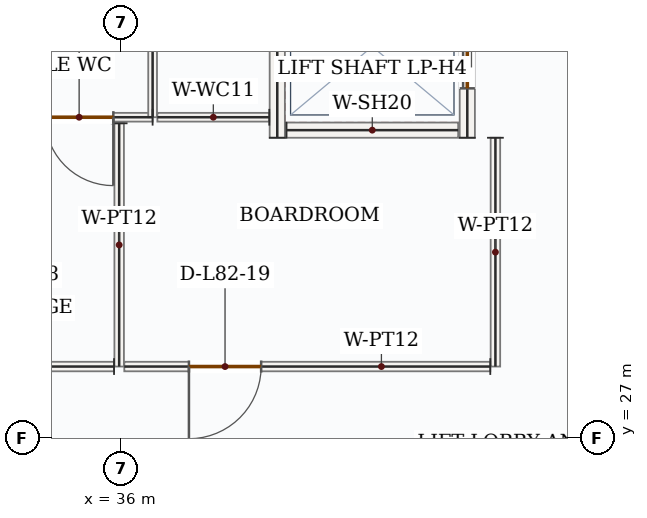
"""IFC4 building model, lengths in metres.
Left out: names, types, materials, properties, quantities, classifications, styles, units other than length and angle.
Written with IfcOpenShell. Run it as: python <this file> out.ifc"""

import sys

from ifc_helpers import new_model, si_unit, direction, frame, frame_2d, origin, place, context, subcontext, project, spatial, rectangle, extrude, source, transform, mapped, element, fill, save


model = new_model("IFC4")
c1 = context("Model", 3, precision=1e-05, world=origin(), true_north=direction((0.0, 1.0)))
c2 = subcontext(c1, "Body", "Model", "MODEL_VIEW")
j1 = project(units=[si_unit("LENGTHUNIT", "METRE"), si_unit("PLANEANGLEUNIT", "RADIAN")], contexts=[c1])
p1 = place(None, origin())
s1 = spatial("IfcSite", under=j1, at=p1, CompositionType="ELEMENT")
p2 = place(p1, origin())
s2 = spatial("IfcBuilding", under=s1, at=p2, CompositionType="ELEMENT")
p3 = place(p2, frame((0.0, 0.0, 338.55)))
s3 = spatial("IfcBuildingStorey", under=s2, at=p3, CompositionType="ELEMENT", Elevation=338.55)
m1 = source(origin(), c2, "Body", "SweptSolid", [
    extrude(rectangle(XDim=2.4, YDim=0.2, at=frame_2d((1.2, 0.0))), origin(), (0.0, 0.0, 1.0), 3.5),
])
p4 = place(p3, frame((38.05, 30.95, 0.0), z_axis=(0.0, 0.0, 1.0), x_axis=(0.0, 1.0, 0.0)))
e1 = element("IfcWall", 1, at=p4, inside=s3, PredefinedType="SOLIDWALL", context=c2, shape_type="MappedRepresentation", body=[
    mapped(m1, transform((0.0, 0.0, 0.0), x_axis=(1.0, 0.0, 0.0), y_axis=(0.0, 1.0, 0.0), z_axis=(0.0, 0.0, 1.0), scale=1.0)),
])
p5 = place(p3, frame((40.55, 30.95, 0.0), z_axis=(0.0, 0.0, 1.0), x_axis=(0.0, 1.0, 0.0)))
e2 = element("IfcWall", 2, at=p5, inside=s3, PredefinedType="SOLIDWALL", context=c2, shape_type="SweptSolid", body=[
    extrude(rectangle(XDim=2.4, YDim=0.2, at=frame_2d((1.2, 0.0))), origin(), (0.0, 0.0, 1.0), 3.5),
])
p6 = place(p5, frame((0.65, 0.0, 0.0)))
e3 = element("IfcOpeningElement", 3, at=p6, cuts=e2, PredefinedType="OPENING", context=c2, shape_type="SweptSolid", body=[
    extrude(rectangle(XDim=1.1, YDim=2.15, at=frame_2d((0.55, 1.075))), frame((0.0, 0.11, 0.0), z_axis=(0.0, -1.0, 0.0), x_axis=(1.0, 0.0, 0.0)), (0.0, 0.0, 1.0), 0.22),
])
m2 = source(origin(), c2, "Body", "SweptSolid", [
    extrude(rectangle(XDim=2.26, YDim=0.2, at=frame_2d((1.13, 0.0))), origin(), (0.0, 0.0, 1.0), 3.5),
])
p7 = place(p3, frame((38.17, 31.05, 0.0), z_axis=(0.0, 0.0, 1.0), x_axis=(1.0, 0.0, 0.0)))
e4 = element("IfcWall", 4, at=p7, inside=s3, PredefinedType="SOLIDWALL", context=c2, shape_type="MappedRepresentation", body=[
    mapped(m2, transform((0.0, 0.0, 0.0), x_axis=(1.0, 0.0, 0.0), y_axis=(0.0, 1.0, 0.0), z_axis=(0.0, 0.0, 1.0), scale=1.0)),
])
p8 = place(p3, frame((36.41, 31.22, 0.0), z_axis=(0.0, 0.0, 1.0), x_axis=(-1.0, 0.0, 0.0)))
e5 = element("IfcWall", 5, at=p8, inside=s3, PredefinedType="PARTITIONING", context=c2, shape_type="SweptSolid", body=[
    extrude(rectangle(XDim=2.355, YDim=0.115, at=frame_2d((1.177, 0.0))), origin(), (0.0, 0.0, 1.0), 3.5),
])
p9 = place(p8, frame((0.517, 0.0, 0.0)))
e6 = element("IfcOpeningElement", 6, at=p9, cuts=e5, PredefinedType="OPENING", context=c2, shape_type="SweptSolid", body=[
    extrude(rectangle(XDim=0.9, YDim=2.1, at=frame_2d((0.45, 1.05))), frame((0.0, 0.067, 0.0), z_axis=(0.0, -1.0, 0.0), x_axis=(1.0, 0.0, 0.0)), (0.0, 0.0, 1.0), 0.135),
])
m3 = source(origin(), c2, "Body", "SweptSolid", [
    extrude(rectangle(XDim=1.96, YDim=0.115, at=frame_2d((0.98, 0.0))), origin(), (0.0, 0.0, 1.0), 3.5),
])
p10 = place(p3, frame((36.41, 33.18, 0.0), z_axis=(0.0, 0.0, 1.0), x_axis=(0.0, -1.0, 0.0)))
e7 = element("IfcWall", 7, at=p10, inside=s3, PredefinedType="PARTITIONING", context=c2, shape_type="MappedRepresentation", body=[
    mapped(m3, transform((0.0, 0.0, 0.0), x_axis=(1.0, 0.0, 0.0), y_axis=(0.0, 1.0, 0.0), z_axis=(0.0, 0.0, 1.0), scale=1.0)),
])
m4 = source(origin(), c2, "Body", "SweptSolid", [
    extrude(rectangle(XDim=1.473, YDim=0.115, at=frame_2d((0.736, 0.0))), origin(), (0.0, 0.0, 1.0), 3.5),
])
p11 = place(p3, frame((37.945, 31.22, 0.0), z_axis=(0.0, 0.0, 1.0), x_axis=(-1.0, 0.0, 0.0)))
e8 = element("IfcWall", 8, at=p11, inside=s3, PredefinedType="PARTITIONING", context=c2, shape_type="MappedRepresentation", body=[
    mapped(m4, transform((0.0, 0.0, 0.0), x_axis=(1.0, 0.0, 0.0), y_axis=(0.0, 1.0, 0.0), z_axis=(0.0, 0.0, 1.0), scale=1.0)),
])
m5 = source(origin(), c2, "Body", "SweptSolid", [
    extrude(rectangle(XDim=3.2, YDim=0.125, at=frame_2d((1.6, 0.0))), origin(), (0.0, 0.0, 1.0), 3.5),
])
p12 = place(p3, frame((35.97, 31.14, 0.0), z_axis=(0.0, 0.0, 1.0), x_axis=(0.0, -1.0, 0.0)))
e9 = element("IfcWall", 9, at=p12, inside=s3, PredefinedType="PARTITIONING", context=c2, shape_type="MappedRepresentation", body=[
    mapped(m5, transform((0.0, 0.0, 0.0), x_axis=(1.0, 0.0, 0.0), y_axis=(0.0, 1.0, 0.0), z_axis=(0.0, 0.0, 1.0), scale=1.0)),
])
p13 = place(p3, frame((35.903, 27.94, 0.0), z_axis=(0.0, 0.0, 1.0), x_axis=(-1.0, 0.0, 0.0)))
e10 = element("IfcWall", 10, at=p13, inside=s3, PredefinedType="PARTITIONING", context=c2, shape_type="SweptSolid", body=[
    extrude(rectangle(XDim=4.823, YDim=0.125, at=frame_2d((2.411, 0.0))), origin(), (0.0, 0.0, 1.0), 3.5),
])
p14 = place(p13, frame((0.852, 0.0, 0.0)))
e11 = element("IfcOpeningElement", 11, at=p14, cuts=e10, PredefinedType="OPENING", context=c2, shape_type="SweptSolid", body=[
    extrude(rectangle(XDim=0.95, YDim=2.15, at=frame_2d((0.475, 1.075))), frame((0.0, 0.073, 0.0), z_axis=(0.0, -1.0, 0.0), x_axis=(1.0, 0.0, 0.0)), (0.0, 0.0, 1.0), 0.145),
])
m6 = source(origin(), c2, "Body", "SweptSolid", [
    extrude(rectangle(XDim=3.01, YDim=0.125, at=frame_2d((1.505, 0.0))), origin(), (0.0, 0.0, 1.0), 3.5),
])
p15 = place(p3, frame((40.92, 30.95, 0.0), z_axis=(0.0, 0.0, 1.0), x_axis=(0.0, -1.0, 0.0)))
e12 = element("IfcWall", 12, at=p15, inside=s3, PredefinedType="PARTITIONING", context=c2, shape_type="MappedRepresentation", body=[
    mapped(m6, transform((0.0, 0.0, 0.0), x_axis=(1.0, 0.0, 0.0), y_axis=(0.0, 1.0, 0.0), z_axis=(0.0, 0.0, 1.0), scale=1.0)),
])
p16 = place(p3, frame((40.853, 27.94, 0.0), z_axis=(0.0, 0.0, 1.0), x_axis=(-1.0, 0.0, 0.0)))
e13 = element("IfcWall", 13, at=p16, inside=s3, PredefinedType="PARTITIONING", context=c2, shape_type="SweptSolid", body=[
    extrude(rectangle(XDim=4.815, YDim=0.125, at=frame_2d((2.407, 0.0))), origin(), (0.0, 0.0, 1.0), 3.5),
])
p17 = place(p16, frame((3.015, 0.0, 0.0)))
e14 = element("IfcOpeningElement", 14, at=p17, cuts=e13, PredefinedType="OPENING", context=c2, shape_type="SweptSolid", body=[
    extrude(rectangle(XDim=0.95, YDim=2.15, at=frame_2d((0.475, 1.075))), frame((0.0, 0.073, 0.0), z_axis=(0.0, -1.0, 0.0), x_axis=(1.0, 0.0, 0.0)), (0.0, 0.0, 1.0), 0.145),
])
m7 = source(origin(), c2, "Body", "SweptSolid", [
    extrude(rectangle(XDim=1.1, YDim=2.15, at=frame_2d((0.55, 1.075))), frame((0.0, 0.025, 0.0), z_axis=(0.0, -1.0, 0.0), x_axis=(1.0, 0.0, 0.0)), (0.0, 0.0, 1.0), 0.05),
])
p18 = place(p6, origin())
e15 = element("IfcDoor", 15, at=p18, inside=s3, OperationType="DOUBLE_DOOR_SLIDING", PredefinedType="DOOR", context=c2, shape_type="MappedRepresentation", body=[
    mapped(m7, transform((0.0, 0.0, 0.0), x_axis=(1.0, 0.0, 0.0), y_axis=(0.0, 1.0, 0.0), z_axis=(0.0, 0.0, 1.0), scale=1.0)),
])
fill(e3, e15)
m8 = source(origin(), c2, "Body", "SweptSolid", [
    extrude(rectangle(XDim=0.95, YDim=2.15, at=frame_2d((0.475, 1.075))), frame((0.0, 0.025, 0.0), z_axis=(0.0, -1.0, 0.0), x_axis=(1.0, 0.0, 0.0)), (0.0, 0.0, 1.0), 0.05),
])
p19 = place(p17, origin())
e16 = element("IfcDoor", 16, at=p19, inside=s3, OperationType="SINGLE_SWING_RIGHT", PredefinedType="DOOR", context=c2, shape_type="MappedRepresentation", body=[
    mapped(m8, transform((0.0, 0.0, 0.0), x_axis=(1.0, 0.0, 0.0), y_axis=(0.0, 1.0, 0.0), z_axis=(0.0, 0.0, 1.0), scale=1.0)),
])
fill(e14, e16)
m9 = source(origin(), c2, "Body", "SweptSolid", [
    extrude(rectangle(XDim=0.9, YDim=2.1, at=frame_2d((0.45, 1.05))), frame((0.0, 0.025, 0.0), z_axis=(0.0, -1.0, 0.0), x_axis=(1.0, 0.0, 0.0)), (0.0, 0.0, 1.0), 0.05),
])
p20 = place(p9, origin())
e17 = element("IfcDoor", 17, at=p20, inside=s3, OperationType="SINGLE_SWING_LEFT", PredefinedType="DOOR", context=c2, shape_type="MappedRepresentation", body=[
    mapped(m9, transform((0.0, 0.0, 0.0), x_axis=(1.0, 0.0, 0.0), y_axis=(0.0, 1.0, 0.0), z_axis=(0.0, 0.0, 1.0), scale=1.0)),
])
fill(e6, e17)
save(model, sys.argv[1])
